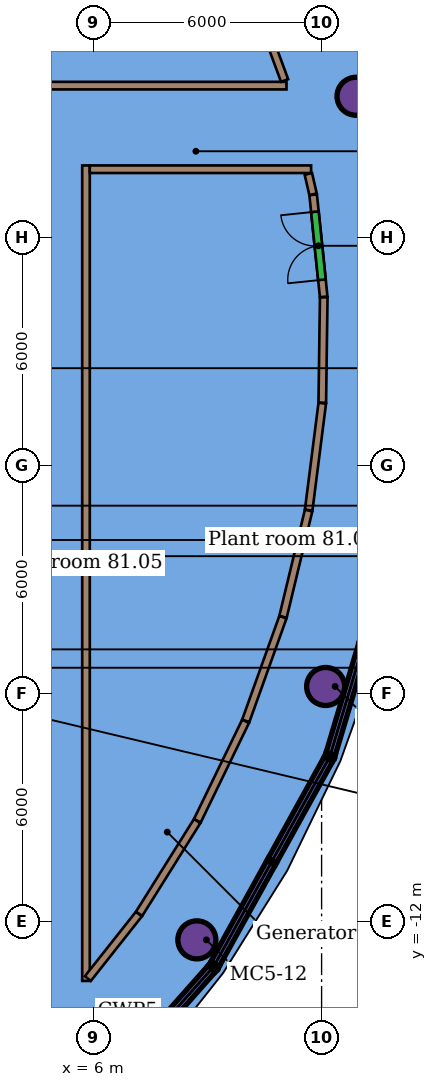
"""IFC4 building model, lengths in metres.
Left out: names, types, materials, properties, quantities, classifications, styles, units other than length and angle.
Written with IfcOpenShell. Run it as: python <this file> out.ifc"""

import sys

from ifc_helpers import new_model, si_unit, direction, frame, frame_2d, origin, origin_2d, place, context, subcontext, project, spatial, rectangle, hollow_circle, extrude, element, fill, save


model = new_model("IFC4")
c1 = context("Model", 3, precision=1e-05, world=origin(), true_north=direction((0.0, 1.0)))
c2 = subcontext(c1, "Body", "Model", "MODEL_VIEW")
j1 = project(units=[si_unit("LENGTHUNIT", "METRE"), si_unit("PLANEANGLEUNIT", "RADIAN")], contexts=[c1])
p1 = place(None, origin())
s1 = spatial("IfcSite", under=j1, at=p1, CompositionType="ELEMENT")
p2 = place(p1, origin())
s2 = spatial("IfcBuilding", under=s1, at=p2, CompositionType="ELEMENT")
p3 = place(p2, frame((0.0, 0.0, 325.5)))
s3 = spatial("IfcBuildingStorey", under=s2, at=p3, CompositionType="ELEMENT", Elevation=325.5)
for number, where, z_axis, x_axis in (
    (1, (8.718, -12.477, 0.0), (0.0, 0.0, 1.0), (1.0, 0.0, 0.0)),
    (2, (12.106, -5.81, 0.0), (0.0, 0.0, 1.0), (1.0, 0.0, 0.0)),
    (3, (12.906, 9.72, 0.0), (0.0, 0.0, 1.0), (1.0, 0.0, 0.0)),
):
    element("IfcColumn", number, at=place(p3, frame(where, z_axis=z_axis, x_axis=x_axis)), inside=s3, PredefinedType="COLUMN", context=c2, shape_type="SweptSolid", body=[
        extrude(hollow_circle(Radius=0.5, WallThickness=0.04, at=origin_2d()), origin(), (0.0, 0.0, 1.0), 3.75),
    ])
p4 = place(p3, frame((-17.9, 10.0, 0.0), z_axis=(0.0, 0.0, 1.0), x_axis=(1.0, 0.0, 0.0)))
e4 = element("IfcWall", 4, at=p4, inside=s3, PredefinedType="PARTITIONING", context=c2, shape_type="SweptSolid", body=[
    extrude(rectangle(XDim=28.976, YDim=0.2, at=frame_2d((14.488, 0.0))), origin(), (0.0, 0.0, 1.0), 3.25),
])
p5 = place(p3, frame((5.8, -13.558, 0.0), z_axis=(0.0, 0.0, 1.0), x_axis=(0.0, 1.0, 0.0)))
e5 = element("IfcWall", 5, at=p5, inside=s3, PredefinedType="PARTITIONING", context=c2, shape_type="SweptSolid", body=[
    extrude(rectangle(XDim=21.458, YDim=0.2, at=frame_2d((10.729, 0.0))), origin(), (0.0, 0.0, 1.0), 3.25),
])
p6 = place(p3, frame((5.9, 7.8, 0.0), z_axis=(0.0, 0.0, 1.0), x_axis=(1.0, 0.0, 0.0)))
e6 = element("IfcWall", 6, at=p6, inside=s3, PredefinedType="PARTITIONING", context=c2, shape_type="SweptSolid", body=[
    extrude(rectangle(XDim=5.824, YDim=0.2, at=frame_2d((2.912, 0.0))), origin(), (0.0, 0.0, 1.0), 3.25),
])
p7 = place(p3, frame((10.319, 12.052, 0.0), z_axis=(0.0, 0.0, 1.0), x_axis=(0.346197844841, -0.938161527791, 0.0)))
e7 = element("IfcWall", 7, at=p7, inside=s3, PredefinedType="PARTITIONING", context=c2, shape_type="SweptSolid", body=[
    extrude(rectangle(XDim=2.044, YDim=0.2, at=frame_2d((1.022, 0.0))), origin(), (0.0, 0.0, 1.0), 3.25),
])
p8 = place(p3, frame((12.018, 1.656, 0.0), z_axis=(0.0, 0.0, 1.0), x_axis=(0.013897320686, 0.999903427576, 0.0)))
e8 = element("IfcWall", 8, at=p8, inside=s3, PredefinedType="PARTITIONING", context=c2, shape_type="SweptSolid", body=[
    extrude(rectangle(XDim=2.776, YDim=0.2, at=frame_2d((1.388, 0.0))), origin(), (0.0, 0.0, 1.0), 3.25),
])
p9 = place(p3, frame((11.659, -1.169, 0.0), z_axis=(0.0, 0.0, 1.0), x_axis=(0.126302032537, 0.991991832919, 0.0)))
e9 = element("IfcWall", 9, at=p9, inside=s3, PredefinedType="PARTITIONING", context=c2, shape_type="SweptSolid", body=[
    extrude(rectangle(XDim=2.836, YDim=0.2, at=frame_2d((1.418, 0.0))), origin(), (0.0, 0.0, 1.0), 3.25),
])
p10 = place(p3, frame((10.984, -3.977, 0.0), z_axis=(0.0, 0.0, 1.0), x_axis=(0.234120678443, 0.972207543648, 0.0)))
e10 = element("IfcWall", 10, at=p10, inside=s3, PredefinedType="PARTITIONING", context=c2, shape_type="SweptSolid", body=[
    extrude(rectangle(XDim=2.877, YDim=0.2, at=frame_2d((1.438, 0.0))), origin(), (0.0, 0.0, 1.0), 3.25),
])
p11 = place(p3, frame((10.004, -6.716, 0.0), z_axis=(0.0, 0.0, 1.0), x_axis=(0.337478197562, 0.941333344873, 0.0)))
e11 = element("IfcWall", 11, at=p11, inside=s3, PredefinedType="PARTITIONING", context=c2, shape_type="SweptSolid", body=[
    extrude(rectangle(XDim=2.898, YDim=0.2, at=frame_2d((1.449, 0.0))), origin(), (0.0, 0.0, 1.0), 3.25),
])
p12 = place(p3, frame((8.73, -9.343, 0.0), z_axis=(0.0, 0.0, 1.0), x_axis=(0.436405284506, 0.89975020292, 0.0)))
e12 = element("IfcWall", 12, at=p12, inside=s3, PredefinedType="PARTITIONING", context=c2, shape_type="SweptSolid", body=[
    extrude(rectangle(XDim=2.909, YDim=0.2, at=frame_2d((1.455, 0.0))), origin(), (0.0, 0.0, 1.0), 3.25),
])
p13 = place(p3, frame((7.198, -11.791, 0.0), z_axis=(0.0, 0.0, 1.0), x_axis=(0.530761457751, 0.847521253401, 0.0)))
e13 = element("IfcWall", 13, at=p13, inside=s3, PredefinedType="PARTITIONING", context=c2, shape_type="SweptSolid", body=[
    extrude(rectangle(XDim=2.877, YDim=0.2, at=frame_2d((1.438, 0.0))), origin(), (0.0, 0.0, 1.0), 3.25),
])
p14 = place(p3, frame((5.849, -13.496, 0.0), z_axis=(0.0, 0.0, 1.0), x_axis=(0.620321195124, 0.784347891487, 0.0)))
e14 = element("IfcWall", 14, at=p14, inside=s3, PredefinedType="PARTITIONING", context=c2, shape_type="SweptSolid", body=[
    extrude(rectangle(XDim=2.163, YDim=0.2, at=frame_2d((1.081, 0.0))), origin(), (0.0, 0.0, 1.0), 3.25),
])
p15 = place(p3, frame((11.652, 7.678, 0.0), z_axis=(0.0, 0.0, 1.0), x_axis=(0.2234024776, -0.974726286196, 0.0)))
e15 = element("IfcWall", 15, at=p15, inside=s3, PredefinedType="PARTITIONING", context=c2, shape_type="SweptSolid", body=[
    extrude(rectangle(XDim=0.551, YDim=0.2, at=frame_2d((0.275, 0.0))), origin(), (0.0, 0.0, 1.0), 3.25),
])
p16 = place(p3, frame((12.055, 4.443, 0.0), z_axis=(0.0, 0.0, 1.0), x_axis=(-0.102877560919, 0.994694027055, 0.0)))
e16 = element("IfcWall", 16, at=p16, inside=s3, PredefinedType="PARTITIONING", context=c2, shape_type="SweptSolid", body=[
    extrude(rectangle(XDim=2.701, YDim=0.2, at=frame_2d((1.35, 0.0))), origin(), (0.0, 0.0, 1.0), 3.25),
])
p17 = place(p16, frame((0.45, 0.0, 0.0)))
e17 = element("IfcOpeningElement", 17, at=p17, cuts=e16, PredefinedType="OPENING", context=c2, shape_type="SweptSolid", body=[
    extrude(rectangle(XDim=1.8, YDim=2.4, at=frame_2d((0.9, 1.2))), frame((0.0, 0.11, 0.0), z_axis=(0.0, -1.0, 0.0), x_axis=(1.0, 0.0, 0.0)), (0.0, 0.0, 1.0), 0.22),
])
p18 = place(p17, origin())
e18 = element("IfcDoor", 18, at=p18, inside=s3, OperationType="DOUBLE_DOOR_SINGLE_SWING", PredefinedType="DOOR", context=c2, shape_type="SweptSolid", body=[
    extrude(rectangle(XDim=1.8, YDim=2.4, at=frame_2d((0.9, 1.2))), frame((0.0, 0.025, 0.0), z_axis=(0.0, -1.0, 0.0), x_axis=(1.0, 0.0, 0.0)), (0.0, 0.0, 1.0), 0.05),
])
fill(e17, e18)
save(model, sys.argv[1])
